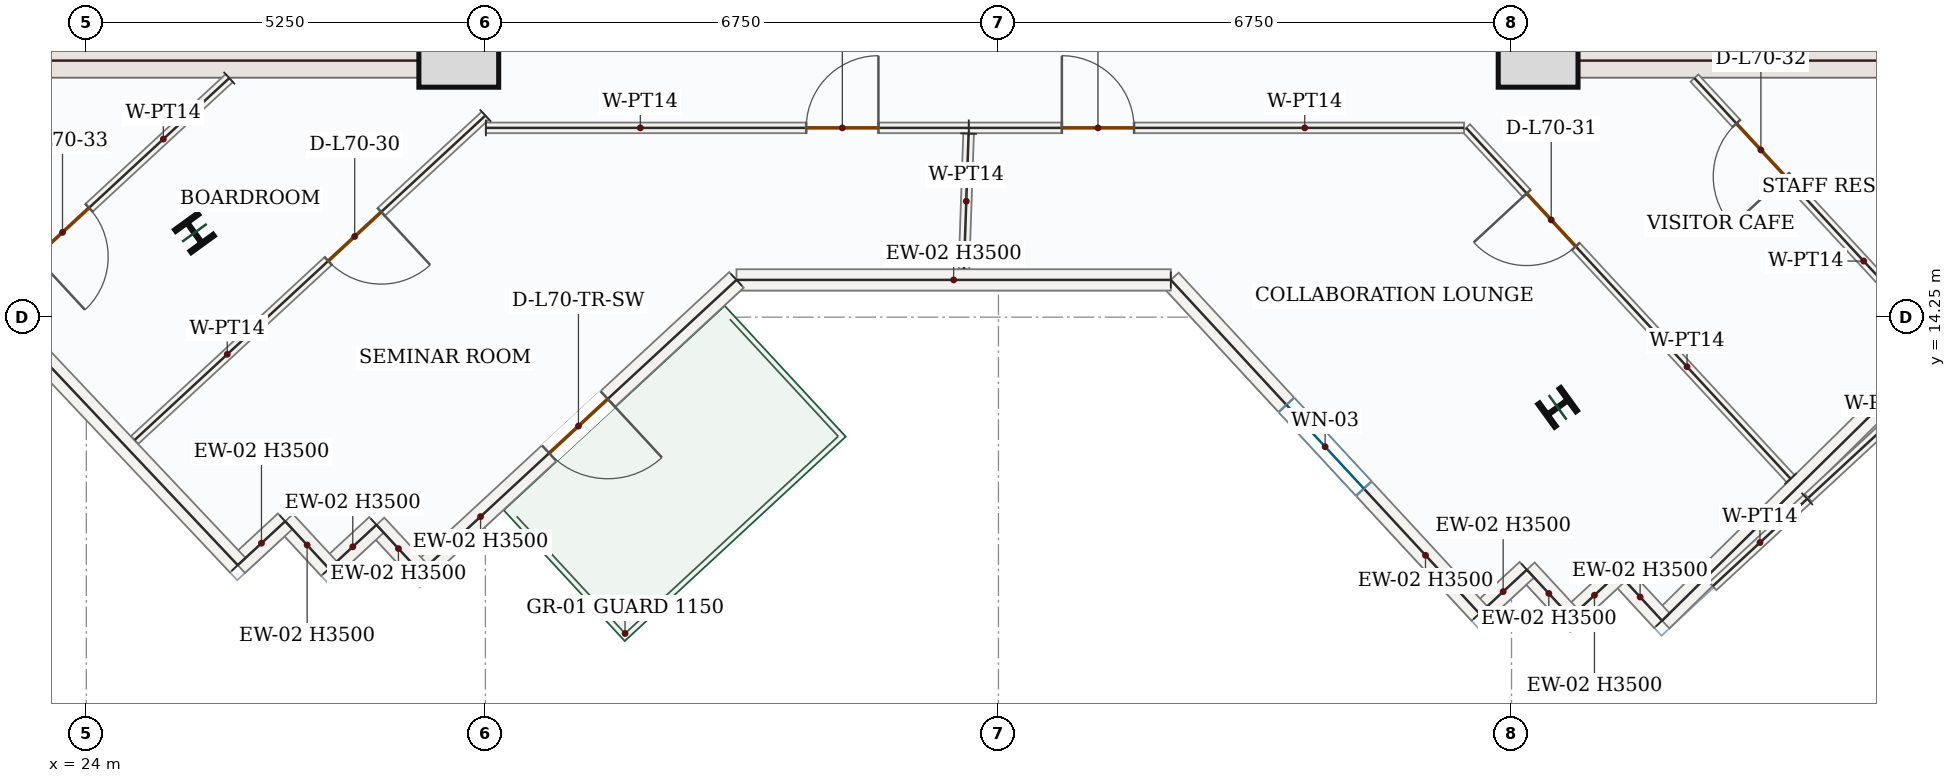
"""IFC4 building model, lengths in metres.
Left out: names, types, materials, properties, quantities, classifications, styles, units other than length and angle.
Written with IfcOpenShell. Run it as: python <this file> out.ifc"""

import sys

from ifc_helpers import new_model, si_unit, direction, frame, frame_2d, origin, origin_2d, place, context, subcontext, project, spatial, rectangle, i_section, extrude, source, transform, mapped, element, fill, save


model = new_model("IFC4")
c1 = context("Model", 3, precision=1e-05, world=origin(), true_north=direction((0.0, 1.0)))
c2 = subcontext(c1, "Body", "Model", "MODEL_VIEW")
j1 = project(units=[si_unit("LENGTHUNIT", "METRE"), si_unit("PLANEANGLEUNIT", "RADIAN")], contexts=[c1])
p1 = place(None, origin())
s1 = spatial("IfcSite", under=j1, at=p1, CompositionType="ELEMENT")
p2 = place(p1, origin())
s2 = spatial("IfcBuilding", under=s1, at=p2, CompositionType="ELEMENT")
p3 = place(p2, frame((0.0, 0.0, 291.6)))
s3 = spatial("IfcBuildingStorey", under=s2, at=p3, CompositionType="ELEMENT", Elevation=291.6)
p4 = place(p3, frame((29.025, 17.4, 0.0), z_axis=(0.0, 0.0, 1.0), x_axis=(0.0, 1.0, 0.0)))
e1 = element("IfcWall", 1, at=p4, inside=s3, PredefinedType="SHEAR", context=c2, shape_type="SweptSolid", body=[
    extrude(rectangle(XDim=8.55, YDim=0.45, at=frame_2d((4.275, 0.0))), origin(), (0.0, 0.0, 1.0), 3.5),
])
p5 = place(p4, frame((6.65, 0.0, 0.0)))
e2 = element("IfcOpeningElement", 2, at=p5, cuts=e1, PredefinedType="OPENING", context=c2, shape_type="SweptSolid", body=[
    extrude(rectangle(XDim=1.1, YDim=2.2, at=frame_2d((0.55, 1.1))), frame((0.0, 0.235, 0.0), z_axis=(0.0, -1.0, 0.0), x_axis=(1.0, 0.0, 0.0)), (0.0, 0.0, 1.0), 0.47),
])
p6 = place(p4, frame((2.15, 0.0, 0.0)))
e3 = element("IfcOpeningElement", 3, at=p6, cuts=e1, PredefinedType="OPENING", context=c2, shape_type="SweptSolid", body=[
    extrude(rectangle(XDim=0.88, YDim=2.1, at=frame_2d((0.44, 1.05))), frame((0.0, 0.235, 0.0), z_axis=(0.0, -1.0, 0.0), x_axis=(1.0, 0.0, 0.0)), (0.0, 0.0, 1.0), 0.47),
])
p7 = place(p4, frame((4.25, 0.0, 0.0)))
e4 = element("IfcOpeningElement", 4, at=p7, cuts=e1, PredefinedType="OPENING", context=c2, shape_type="SweptSolid", body=[
    extrude(rectangle(XDim=0.88, YDim=2.1, at=frame_2d((0.44, 1.05))), frame((0.0, 0.235, 0.0), z_axis=(0.0, -1.0, 0.0), x_axis=(1.0, 0.0, 0.0)), (0.0, 0.0, 1.0), 0.47),
])
m1 = source(origin(), c2, "Body", "SweptSolid", [
    extrude(rectangle(XDim=7.1, YDim=0.45, at=frame_2d((3.55, 0.0))), origin(), (0.0, 0.0, 1.0), 3.5),
])
p8 = place(p3, frame((21.7, 17.625, 0.0), z_axis=(0.0, 0.0, 1.0), x_axis=(1.0, 0.0, 0.0)))
e5 = element("IfcWall", 5, at=p8, inside=s3, PredefinedType="SHEAR", context=c2, shape_type="MappedRepresentation", body=[
    mapped(m1, transform((0.0, 0.0, 0.0), x_axis=(1.0, 0.0, 0.0), y_axis=(0.0, 1.0, 0.0), z_axis=(0.0, 0.0, 1.0), scale=1.0)),
])
p9 = place(p3, frame((42.975, 17.4, 0.0), z_axis=(0.0, 0.0, 1.0), x_axis=(0.0, 1.0, 0.0)))
e6 = element("IfcWall", 6, at=p9, inside=s3, PredefinedType="SHEAR", context=c2, shape_type="SweptSolid", body=[
    extrude(rectangle(XDim=8.55, YDim=0.45, at=frame_2d((4.275, 0.0))), origin(), (0.0, 0.0, 1.0), 3.5),
])
p10 = place(p9, frame((6.65, 0.0, 0.0)))
e7 = element("IfcOpeningElement", 7, at=p10, cuts=e6, PredefinedType="OPENING", context=c2, shape_type="SweptSolid", body=[
    extrude(rectangle(XDim=1.1, YDim=2.2, at=frame_2d((0.55, 1.1))), frame((0.0, 0.235, 0.0), z_axis=(0.0, -1.0, 0.0), x_axis=(1.0, 0.0, 0.0)), (0.0, 0.0, 1.0), 0.47),
])
p11 = place(p9, frame((1.75, 0.0, 0.0)))
e8 = element("IfcOpeningElement", 8, at=p11, cuts=e6, PredefinedType="OPENING", context=c2, shape_type="SweptSolid", body=[
    extrude(rectangle(XDim=1.3, YDim=2.2, at=frame_2d((0.65, 1.1))), frame((0.0, 0.235, 0.0), z_axis=(0.0, -1.0, 0.0), x_axis=(1.0, 0.0, 0.0)), (0.0, 0.0, 1.0), 0.47),
])
p12 = place(p9, frame((4.55, 0.0, 0.0)))
e9 = element("IfcOpeningElement", 9, at=p12, cuts=e6, PredefinedType="OPENING", context=c2, shape_type="SweptSolid", body=[
    extrude(rectangle(XDim=0.88, YDim=2.1, at=frame_2d((0.44, 1.05))), frame((0.0, 0.235, 0.0), z_axis=(0.0, -1.0, 0.0), x_axis=(1.0, 0.0, 0.0)), (0.0, 0.0, 1.0), 0.47),
])
p13 = place(p3, frame((43.2, 17.625, 0.0), z_axis=(0.0, 0.0, 1.0), x_axis=(1.0, 0.0, 0.0)))
e10 = element("IfcWall", 10, at=p13, inside=s3, PredefinedType="SHEAR", context=c2, shape_type="MappedRepresentation", body=[
    mapped(m1, transform((0.0, 0.0, 0.0), x_axis=(1.0, 0.0, 0.0), y_axis=(0.0, 1.0, 0.0), z_axis=(0.0, 0.0, 1.0), scale=1.0)),
])
m2 = source(origin(), c2, "Body", "SweptSolid", [
    extrude(rectangle(XDim=1.05, YDim=1.05, at=origin_2d()), origin(), (0.0, 0.0, 1.0), 3.75),
])
for number, where, z_axis, x_axis in (
    (11, (28.9, 17.8, 0.0), (0.0, 0.0, 1.0), (1.0, 0.0, 0.0)),
    (12, (43.1, 17.8, 0.0), (0.0, 0.0, 1.0), (1.0, 0.0, 0.0)),
):
    element("IfcColumn", number, at=place(p3, frame(where, z_axis=z_axis, x_axis=x_axis)), inside=s3, PredefinedType="COLUMN", context=c2, shape_type="MappedRepresentation", body=[
        mapped(m2, transform((0.0, 0.0, 0.0), x_axis=(1.0, 0.0, 0.0), y_axis=(0.0, 1.0, 0.0), z_axis=(0.0, 0.0, 1.0), scale=1.0)),
    ])
m3 = source(origin(), c2, "Body", "SweptSolid", [
    extrude(i_section(OverallWidth=0.374, OverallDepth=0.372, WebThickness=0.016, FlangeThickness=0.026, FilletRadius=0.018, at=origin_2d()), origin(), (0.0, 0.0, 1.0), 3.75),
])
for number, where, z_axis, x_axis in (
    (13, (25.422, 15.359, 0.0), (0.0, 0.0, 1.0), (0.809, 0.588, 0.0)),
    (14, (43.357, 13.063, 0.0), (0.0, 0.0, 1.0), (-0.588, 0.809, 0.0)),
):
    element("IfcColumn", number, at=place(p3, frame(where, z_axis=z_axis, x_axis=x_axis)), inside=s3, PredefinedType="COLUMN", context=c2, shape_type="MappedRepresentation", body=[
        mapped(m3, transform((0.0, 0.0, 0.0), x_axis=(1.0, 0.0, 0.0), y_axis=(0.0, 1.0, 0.0), z_axis=(0.0, 0.0, 1.0), scale=1.0)),
    ])
m4 = source(origin(), c2, "Body", "SweptSolid", [
    extrude(rectangle(XDim=11.69, YDim=0.28, at=frame_2d((5.845, 0.0))), origin(), (0.0, 0.0, 1.0), 3.5),
])
p14 = place(p3, frame((53.06, 18.458, 0.0), z_axis=(0.0, 0.0, 1.0), x_axis=(-0.712557502542, -0.701613715353, 0.0)))
e15 = element("IfcWall", 15, at=p14, inside=s3, PredefinedType="SOLIDWALL", context=c2, shape_type="MappedRepresentation", body=[
    mapped(m4, transform((0.0, 0.0, 0.0), x_axis=(1.0, 0.0, 0.0), y_axis=(0.0, 1.0, 0.0), z_axis=(0.0, 0.0, 1.0), scale=1.0)),
])
m5 = source(origin(), c2, "Body", "SweptSolid", [
    extrude(rectangle(XDim=0.85, YDim=0.28, at=frame_2d((0.425, 0.0))), origin(), (0.0, 0.0, 1.0), 3.5),
])
for number, where, z_axis, x_axis in (
    (16, (44.73, 10.256, 0.0), (0.0, 0.0, 1.0), (-0.679, 0.734, 0.0)),
    (17, (44.153, 10.88, 0.0), (0.0, 0.0, 1.0), (-0.734, -0.679, 0.0)),
    (18, (43.529, 10.303, 0.0), (0.0, 0.0, 1.0), (-0.679, 0.734, 0.0)),
):
    element("IfcWall", number, at=place(p3, frame(where, z_axis=z_axis, x_axis=x_axis)), inside=s3, PredefinedType="SOLIDWALL", context=c2, shape_type="MappedRepresentation", body=[
        mapped(m5, transform((0.0, 0.0, 0.0), x_axis=(1.0, 0.0, 0.0), y_axis=(0.0, 1.0, 0.0), z_axis=(0.0, 0.0, 1.0), scale=1.0)),
    ])
m6 = source(origin(), c2, "Body", "SweptSolid", [
    extrude(rectangle(XDim=0.85, YDim=0.28, at=frame_2d((0.425, 0.0))), origin(), (0.0, 0.0, 1.0), 3.5),
])
p15 = place(p3, frame((42.952, 10.927, 0.0), z_axis=(0.0, 0.0, 1.0), x_axis=(-0.73428557742, -0.678840696183, 0.0)))
e19 = element("IfcWall", 19, at=p15, inside=s3, PredefinedType="SOLIDWALL", context=c2, shape_type="MappedRepresentation", body=[
    mapped(m6, transform((0.0, 0.0, 0.0), x_axis=(1.0, 0.0, 0.0), y_axis=(0.0, 1.0, 0.0), z_axis=(0.0, 0.0, 1.0), scale=1.0)),
])
p16 = place(p3, frame((42.328, 10.35, 0.0), z_axis=(0.0, 0.0, 1.0), x_axis=(-0.679010627727, 0.734128440693, 0.0)))
e20 = element("IfcWall", 20, at=p16, inside=s3, PredefinedType="SOLIDWALL", context=c2, shape_type="SweptSolid", body=[
    extrude(rectangle(XDim=5.98, YDim=0.28, at=frame_2d((2.99, 0.0))), origin(), (0.0, 0.0, 1.0), 3.5),
])
p17 = place(p16, frame((2.24, 0.0, 0.85)))
e21 = element("IfcOpeningElement", 21, at=p17, cuts=e20, PredefinedType="OPENING", context=c2, shape_type="SweptSolid", body=[
    extrude(rectangle(XDim=1.5, YDim=1.5, at=frame_2d((0.75, 0.75))), frame((0.0, 0.15, 0.0), z_axis=(0.0, -1.0, 0.0), x_axis=(1.0, 0.0, 0.0)), (0.0, 0.0, 1.0), 0.3),
])
m7 = source(origin(), c2, "Body", "SweptSolid", [
    extrude(rectangle(XDim=5.714, YDim=0.28, at=frame_2d((2.857, 0.0))), origin(), (0.0, 0.0, 1.0), 3.5),
])
p18 = place(p3, frame((38.268, 14.74, 0.0), z_axis=(0.0, 0.0, 1.0), x_axis=(-1.0, 0.0, 0.0)))
e22 = element("IfcWall", 22, at=p18, inside=s3, PredefinedType="SOLIDWALL", context=c2, shape_type="MappedRepresentation", body=[
    mapped(m7, transform((0.0, 0.0, 0.0), x_axis=(1.0, 0.0, 0.0), y_axis=(0.0, 1.0, 0.0), z_axis=(0.0, 0.0, 1.0), scale=1.0)),
])
p19 = place(p3, frame((32.553, 14.74, 0.0), z_axis=(0.0, 0.0, 1.0), x_axis=(-0.734109106874, -0.679031530346, 0.0)))
e23 = element("IfcWall", 23, at=p19, inside=s3, PredefinedType="SOLIDWALL", context=c2, shape_type="SweptSolid", body=[
    extrude(rectangle(XDim=5.665, YDim=0.28, at=frame_2d((2.833, 0.0))), origin(), (0.0, 0.0, 1.0), 3.5),
])
p20 = place(p19, frame((2.307, 0.0, 0.0)))
e24 = element("IfcOpeningElement", 24, at=p20, cuts=e23, PredefinedType="OPENING", context=c2, shape_type="SweptSolid", body=[
    extrude(rectangle(XDim=1.05, YDim=2.15, at=frame_2d((0.525, 1.075))), frame((0.0, 0.15, 0.0), z_axis=(0.0, -1.0, 0.0), x_axis=(1.0, 0.0, 0.0)), (0.0, 0.0, 1.0), 0.3),
])
for number, where, z_axis, x_axis in (
    (25, (28.395, 10.893, 0.0), (0.0, 0.0, 1.0), (-0.679, 0.734, 0.0)),
    (26, (27.817, 11.517, 0.0), (0.0, 0.0, 1.0), (-0.734, -0.679, 0.0)),
    (27, (27.193, 10.94, 0.0), (0.0, 0.0, 1.0), (-0.679, 0.734, 0.0)),
    (28, (26.616, 11.564, 0.0), (0.0, 0.0, 1.0), (-0.734, -0.679, 0.0)),
):
    element("IfcWall", number, at=place(p3, frame(where, z_axis=z_axis, x_axis=x_axis)), inside=s3, PredefinedType="SOLIDWALL", context=c2, shape_type="MappedRepresentation", body=[
        mapped(m5, transform((0.0, 0.0, 0.0), x_axis=(1.0, 0.0, 0.0), y_axis=(0.0, 1.0, 0.0), z_axis=(0.0, 0.0, 1.0), scale=1.0)),
    ])
m8 = source(origin(), c2, "Body", "SweptSolid", [
    extrude(rectangle(XDim=10.274, YDim=0.28, at=frame_2d((5.137, 0.0))), origin(), (0.0, 0.0, 1.0), 3.5),
])
p21 = place(p3, frame((25.992, 10.987, 0.0), z_axis=(0.0, 0.0, 1.0), x_axis=(-0.68643580465, 0.727190405667, 0.0)))
e29 = element("IfcWall", 29, at=p21, inside=s3, PredefinedType="SOLIDWALL", context=c2, shape_type="MappedRepresentation", body=[
    mapped(m8, transform((0.0, 0.0, 0.0), x_axis=(1.0, 0.0, 0.0), y_axis=(0.0, 1.0, 0.0), z_axis=(0.0, 0.0, 1.0), scale=1.0)),
])
p22 = place(p3, frame((25.881, 17.395, 0.0), z_axis=(0.0, 0.0, 1.0), x_axis=(-0.734127876216, -0.679011238024, 0.0)))
e30 = element("IfcWall", 30, at=p22, inside=s3, PredefinedType="PARTITIONING", context=c2, shape_type="SweptSolid", body=[
    extrude(rectangle(XDim=4.173, YDim=0.14, at=frame_2d((2.086, 0.0))), origin(), (0.0, 0.0, 1.0), 3.5),
])
p23 = place(p22, frame((2.514, 0.0, 0.0)))
e31 = element("IfcOpeningElement", 31, at=p23, cuts=e30, PredefinedType="OPENING", context=c2, shape_type="SweptSolid", body=[
    extrude(rectangle(XDim=0.95, YDim=2.15, at=frame_2d((0.475, 1.075))), frame((0.0, 0.08, 0.0), z_axis=(0.0, -1.0, 0.0), x_axis=(1.0, 0.0, 0.0)), (0.0, 0.0, 1.0), 0.16),
])
p24 = place(p3, frame((48.311, 13.985, 0.0), z_axis=(0.0, 0.0, 1.0), x_axis=(-0.679002327249, 0.73413611789, 0.0)))
e32 = element("IfcWall", 32, at=p24, inside=s3, PredefinedType="PARTITIONING", context=c2, shape_type="SweptSolid", body=[
    extrude(rectangle(XDim=4.645, YDim=0.14, at=frame_2d((2.323, 0.0))), origin(), (0.0, 0.0, 1.0), 3.5),
])
p25 = place(p24, frame((2.882, 0.0, 0.0)))
e33 = element("IfcOpeningElement", 33, at=p25, cuts=e32, PredefinedType="OPENING", context=c2, shape_type="SweptSolid", body=[
    extrude(rectangle(XDim=0.95, YDim=2.15, at=frame_2d((0.475, 1.075))), frame((0.0, 0.08, 0.0), z_axis=(0.0, -1.0, 0.0), x_axis=(1.0, 0.0, 0.0)), (0.0, 0.0, 1.0), 0.16),
])
p26 = place(p3, frame((29.25, 16.902, 0.0), z_axis=(0.0, 0.0, 1.0), x_axis=(-0.734113479195, -0.679026803347, 0.0)))
e34 = element("IfcWall", 34, at=p26, inside=s3, PredefinedType="PARTITIONING", context=c2, shape_type="SweptSolid", body=[
    extrude(rectangle(XDim=6.284, YDim=0.14, at=frame_2d((3.142, 0.0))), origin(), (0.0, 0.0, 1.0), 3.5),
])
p27 = place(p26, frame((1.867, 0.0, 0.0)))
e35 = element("IfcOpeningElement", 35, at=p27, cuts=e34, PredefinedType="OPENING", context=c2, shape_type="SweptSolid", body=[
    extrude(rectangle(XDim=0.95, YDim=2.15, at=frame_2d((0.475, 1.075))), frame((0.0, 0.08, 0.0), z_axis=(0.0, -1.0, 0.0), x_axis=(1.0, 0.0, 0.0)), (0.0, 0.0, 1.0), 0.16),
])
m9 = source(origin(), c2, "Body", "SweptSolid", [
    extrude(rectangle(XDim=2.63, YDim=0.14, at=frame_2d((1.315, 0.0))), origin(), (0.0, 0.0, 1.0), 3.5),
])
p28 = place(p3, frame((48.585, 13.658, 0.0), z_axis=(0.0, 0.0, 1.0), x_axis=(-0.73409481217, -0.679046984196, 0.0)))
e36 = element("IfcWall", 36, at=p28, inside=s3, PredefinedType="PARTITIONING", context=c2, shape_type="MappedRepresentation", body=[
    mapped(m9, transform((0.0, 0.0, 0.0), x_axis=(1.0, 0.0, 0.0), y_axis=(0.0, 1.0, 0.0), z_axis=(0.0, 0.0, 1.0), scale=1.0)),
])
p29 = place(p3, frame((46.421, 12.125, 0.0), z_axis=(0.0, 0.0, 1.0), x_axis=(-0.679016867794, 0.734122669076, 0.0)))
e37 = element("IfcWall", 37, at=p29, inside=s3, PredefinedType="PARTITIONING", context=c2, shape_type="SweptSolid", body=[
    extrude(rectangle(XDim=6.287, YDim=0.14, at=frame_2d((3.143, 0.0))), origin(), (0.0, 0.0, 1.0), 3.5),
])
p30 = place(p29, frame((4.163, 0.0, 0.0)))
e38 = element("IfcOpeningElement", 38, at=p30, cuts=e37, PredefinedType="OPENING", context=c2, shape_type="SweptSolid", body=[
    extrude(rectangle(XDim=0.95, YDim=2.15, at=frame_2d((0.475, 1.075))), frame((0.0, 0.08, 0.0), z_axis=(0.0, -1.0, 0.0), x_axis=(1.0, 0.0, 0.0)), (0.0, 0.0, 1.0), 0.16),
])
p31 = place(p3, frame((29.256, 16.74, 0.0), z_axis=(0.0, 0.0, 1.0), x_axis=(1.0, 0.0, 0.0)))
e39 = element("IfcWall", 39, at=p31, inside=s3, PredefinedType="PARTITIONING", context=c2, shape_type="SweptSolid", body=[
    extrude(rectangle(XDim=6.354, YDim=0.14, at=frame_2d((3.177, 0.0))), origin(), (0.0, 0.0, 1.0), 3.5),
])
p32 = place(p31, frame((4.215, 0.0, 0.0)))
e40 = element("IfcOpeningElement", 40, at=p32, cuts=e39, PredefinedType="OPENING", context=c2, shape_type="SweptSolid", body=[
    extrude(rectangle(XDim=0.95, YDim=2.15, at=frame_2d((0.475, 1.075))), frame((0.0, 0.08, 0.0), z_axis=(0.0, -1.0, 0.0), x_axis=(1.0, 0.0, 0.0)), (0.0, 0.0, 1.0), 0.16),
])
m10 = source(origin(), c2, "Body", "SweptSolid", [
    extrude(rectangle(XDim=1.781, YDim=0.14, at=frame_2d((0.891, 0.0))), origin(), (0.0, 0.0, 1.0), 3.5),
])
p33 = place(p3, frame((35.607, 16.665, 0.0), z_axis=(0.0, 0.0, 1.0), x_axis=(-0.034268709891, -0.999412655274, 0.0)))
e41 = element("IfcWall", 41, at=p33, inside=s3, PredefinedType="PARTITIONING", context=c2, shape_type="MappedRepresentation", body=[
    mapped(m10, transform((0.0, 0.0, 0.0), x_axis=(1.0, 0.0, 0.0), y_axis=(0.0, 1.0, 0.0), z_axis=(0.0, 0.0, 1.0), scale=1.0)),
])
p34 = place(p3, frame((35.61, 16.74, 0.0), z_axis=(0.0, 0.0, 1.0), x_axis=(1.0, 0.0, 0.0)))
e42 = element("IfcWall", 42, at=p34, inside=s3, PredefinedType="PARTITIONING", context=c2, shape_type="SweptSolid", body=[
    extrude(rectangle(XDim=6.515, YDim=0.14, at=frame_2d((3.258, 0.0))), origin(), (0.0, 0.0, 1.0), 3.5),
])
p35 = place(p34, frame((1.224, 0.0, 0.0)))
e43 = element("IfcOpeningElement", 43, at=p35, cuts=e42, PredefinedType="OPENING", context=c2, shape_type="SweptSolid", body=[
    extrude(rectangle(XDim=0.95, YDim=2.15, at=frame_2d((0.475, 1.075))), frame((0.0, 0.08, 0.0), z_axis=(0.0, -1.0, 0.0), x_axis=(1.0, 0.0, 0.0)), (0.0, 0.0, 1.0), 0.16),
])
m11 = source(origin(), c2, "Body", "SweptSolid", [
    extrude(rectangle(XDim=1.692, YDim=0.14, at=frame_2d((0.846, 0.0))), origin(), (0.0, 0.0, 1.0), 3.5),
])
p36 = place(p3, frame((46.64, 11.859, 0.0), z_axis=(0.0, 0.0, 1.0), x_axis=(-0.734194722112, -0.678938958982, 0.0)))
e44 = element("IfcWall", 44, at=p36, inside=s3, PredefinedType="PARTITIONING", context=c2, shape_type="MappedRepresentation", body=[
    mapped(m11, transform((0.0, 0.0, 0.0), x_axis=(1.0, 0.0, 0.0), y_axis=(0.0, 1.0, 0.0), z_axis=(0.0, 0.0, 1.0), scale=1.0)),
])
m12 = source(origin(), c2, "Body", "SweptSolid", [
    extrude(rectangle(XDim=1.5, YDim=1.5, at=frame_2d((0.75, 0.75))), frame((0.0, 0.03, 0.0), z_axis=(0.0, -1.0, 0.0), x_axis=(1.0, 0.0, 0.0)), (0.0, 0.0, 1.0), 0.06),
])
p37 = place(p17, origin())
e45 = element("IfcWindow", 45, at=p37, inside=s3, PartitioningType="SINGLE_PANEL", PredefinedType="WINDOW", context=c2, shape_type="MappedRepresentation", body=[
    mapped(m12, transform((0.0, 0.0, 0.0), x_axis=(1.0, 0.0, 0.0), y_axis=(0.0, 1.0, 0.0), z_axis=(0.0, 0.0, 1.0), scale=1.0)),
])
fill(e21, e45)
m13 = source(origin(), c2, "Body", "SweptSolid", [
    extrude(rectangle(XDim=1.05, YDim=2.15, at=frame_2d((0.525, 1.075))), frame((0.0, 0.025, 0.0), z_axis=(0.0, -1.0, 0.0), x_axis=(1.0, 0.0, 0.0)), (0.0, 0.0, 1.0), 0.05),
])
p38 = place(p20, origin())
e46 = element("IfcDoor", 46, at=p38, inside=s3, OperationType="SINGLE_SWING_LEFT", PredefinedType="DOOR", context=c2, shape_type="MappedRepresentation", body=[
    mapped(m13, transform((0.0, 0.0, 0.0), x_axis=(1.0, 0.0, 0.0), y_axis=(0.0, 1.0, 0.0), z_axis=(0.0, 0.0, 1.0), scale=1.0)),
])
fill(e24, e46)
m14 = source(origin(), c2, "Body", "SweptSolid", [
    extrude(rectangle(XDim=0.95, YDim=2.15, at=frame_2d((0.475, 1.075))), frame((0.0, 0.025, 0.0), z_axis=(0.0, -1.0, 0.0), x_axis=(1.0, 0.0, 0.0)), (0.0, 0.0, 1.0), 0.05),
])
p39 = place(p32, origin())
e47 = element("IfcDoor", 47, at=p39, inside=s3, OperationType="SINGLE_SWING_RIGHT", PredefinedType="DOOR", context=c2, shape_type="MappedRepresentation", body=[
    mapped(m14, transform((0.0, 0.0, 0.0), x_axis=(1.0, 0.0, 0.0), y_axis=(0.0, 1.0, 0.0), z_axis=(0.0, 0.0, 1.0), scale=1.0)),
])
fill(e40, e47)
p40 = place(p35, origin())
e48 = element("IfcDoor", 48, at=p40, inside=s3, OperationType="SINGLE_SWING_LEFT", PredefinedType="DOOR", context=c2, shape_type="MappedRepresentation", body=[
    mapped(m14, transform((0.0, 0.0, 0.0), x_axis=(1.0, 0.0, 0.0), y_axis=(0.0, 1.0, 0.0), z_axis=(0.0, 0.0, 1.0), scale=1.0)),
])
fill(e43, e48)
p41 = place(p27, origin())
e49 = element("IfcDoor", 49, at=p41, inside=s3, OperationType="SINGLE_SWING_LEFT", PredefinedType="DOOR", context=c2, shape_type="MappedRepresentation", body=[
    mapped(m14, transform((0.0, 0.0, 0.0), x_axis=(1.0, 0.0, 0.0), y_axis=(0.0, 1.0, 0.0), z_axis=(0.0, 0.0, 1.0), scale=1.0)),
])
fill(e35, e49)
p42 = place(p30, origin())
e50 = element("IfcDoor", 50, at=p42, inside=s3, OperationType="SINGLE_SWING_RIGHT", PredefinedType="DOOR", context=c2, shape_type="MappedRepresentation", body=[
    mapped(m14, transform((0.0, 0.0, 0.0), x_axis=(1.0, 0.0, 0.0), y_axis=(0.0, 1.0, 0.0), z_axis=(0.0, 0.0, 1.0), scale=1.0)),
])
fill(e38, e50)
p43 = place(p25, origin())
e51 = element("IfcDoor", 51, at=p43, inside=s3, OperationType="SINGLE_SWING_LEFT", PredefinedType="DOOR", context=c2, shape_type="MappedRepresentation", body=[
    mapped(m14, transform((0.0, 0.0, 0.0), x_axis=(1.0, 0.0, 0.0), y_axis=(0.0, 1.0, 0.0), z_axis=(0.0, 0.0, 1.0), scale=1.0)),
])
fill(e33, e51)
p44 = place(p23, origin())
e52 = element("IfcDoor", 52, at=p44, inside=s3, OperationType="SINGLE_SWING_RIGHT", PredefinedType="DOOR", context=c2, shape_type="MappedRepresentation", body=[
    mapped(m14, transform((0.0, 0.0, 0.0), x_axis=(1.0, 0.0, 0.0), y_axis=(0.0, 1.0, 0.0), z_axis=(0.0, 0.0, 1.0), scale=1.0)),
])
fill(e31, e52)
save(model, sys.argv[1])
